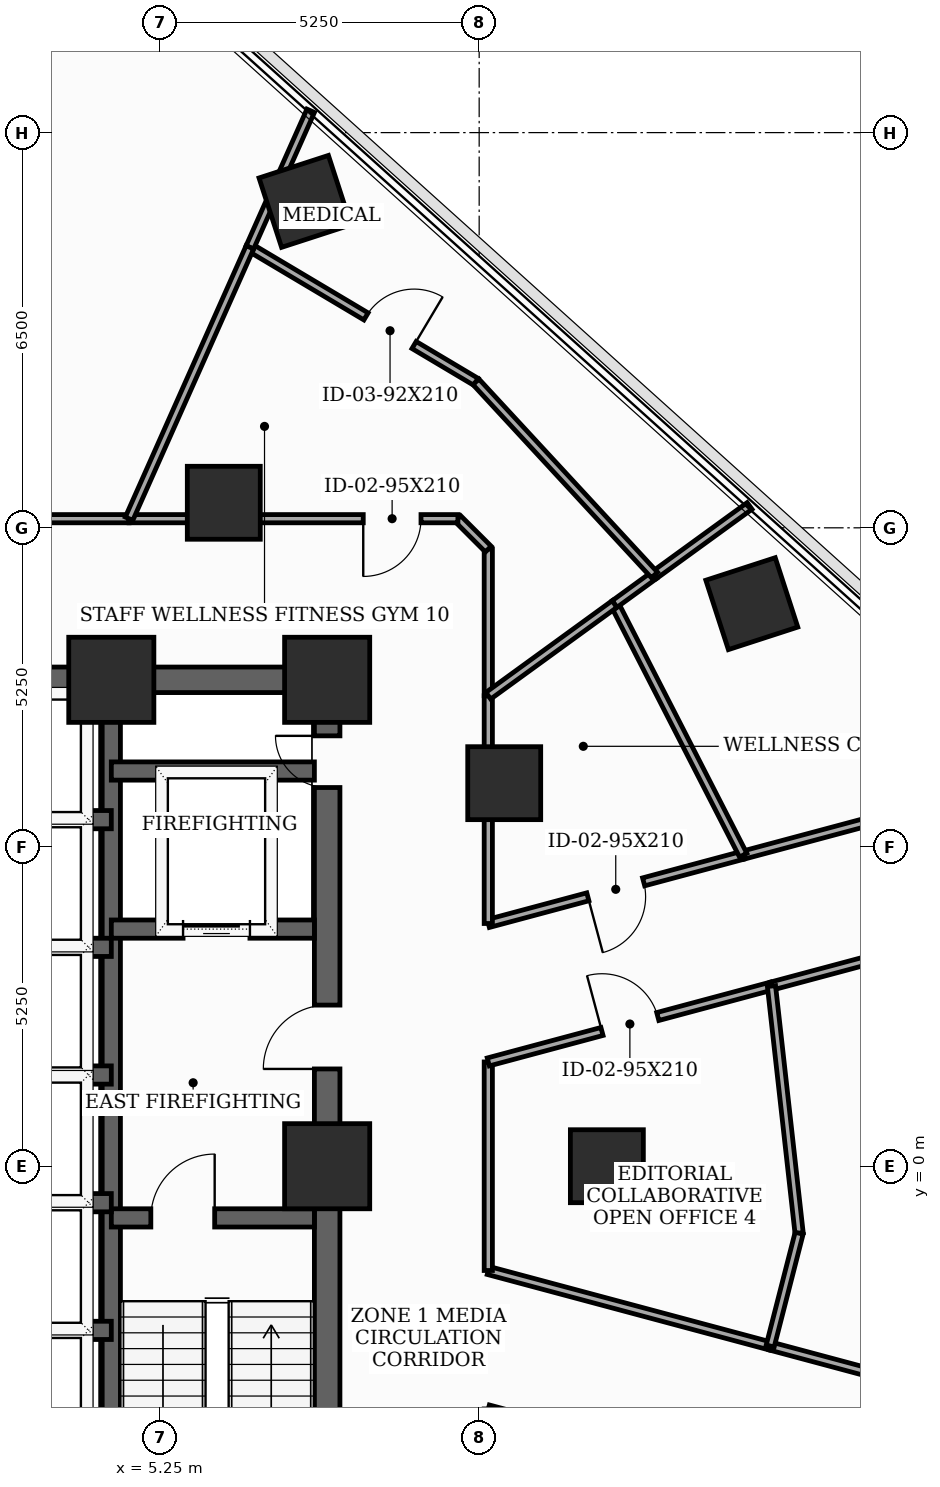
"""IFC4 building model, lengths in metres.
Left out: names, types, materials, properties, quantities, classifications, styles, units other than length and angle.
Written with IfcOpenShell. Run it as: python <this file> out.ifc"""

import sys

from ifc_helpers import new_model, si_unit, direction, frame, frame_2d, origin, origin_2d, place, context, subcontext, project, spatial, rectangle, extrude, element, fill, save


model = new_model("IFC4")
c1 = context("Model", 3, precision=1e-05, world=origin(), true_north=direction((0.0, 1.0)))
c2 = subcontext(c1, "Body", "Model", "MODEL_VIEW")
j1 = project(units=[si_unit("LENGTHUNIT", "METRE"), si_unit("PLANEANGLEUNIT", "RADIAN")], contexts=[c1])
p1 = place(None, origin())
s1 = spatial("IfcSite", under=j1, at=p1, CompositionType="ELEMENT")
p2 = place(p1, origin())
s2 = spatial("IfcBuilding", under=s1, at=p2, CompositionType="ELEMENT")
p3 = place(p2, frame((0.0, 0.0, 101.4)))
s3 = spatial("IfcBuildingStorey", under=s2, at=p3, CompositionType="ELEMENT", Elevation=101.4)
for number, where, z_axis, x_axis in (
    (1, (8.0, 0.0, 0.0), (0.0, 0.0, 1.0), (1.0, 0.0, 0.0)),
    (2, (8.0, 8.0, 0.0), (0.0, 0.0, 1.0), (1.0, 0.0, 0.0)),
    (3, (4.45, 8.0, 0.0), (0.0, 0.0, 1.0), (1.0, 0.0, 0.0)),
):
    element("IfcColumn", number, at=place(p3, frame(where, z_axis=z_axis, x_axis=x_axis)), inside=s3, PredefinedType="COLUMN", context=c2, shape_type="SweptSolid", body=[
        extrude(rectangle(XDim=1.4, YDim=1.4, at=origin_2d()), origin(), (0.0, 0.0, 1.0), 3.7),
    ])
for number, where, z_axis, x_axis in (
    (4, (12.6, 0.0, 0.0), (0.0, 0.0, 1.0), (1.0, 0.0, 0.0)),
    (5, (10.912, 6.3, 0.0), (0.0, 0.0, 1.0), (1.0, 0.0, 0.0)),
    (6, (6.3, 10.912, 0.0), (0.0, 0.0, 1.0), (1.0, 0.0, 0.0)),
    (7, (14.984, 9.252, 0.0), (0.0, 0.0, 1.0), (0.951, 0.309, 0.0)),
    (8, (7.635, 15.869, 0.0), (0.0, 0.0, 1.0), (0.951, 0.309, 0.0)),
):
    element("IfcColumn", number, at=place(p3, frame(where, z_axis=z_axis, x_axis=x_axis)), inside=s3, PredefinedType="COLUMN", context=c2, shape_type="SweptSolid", body=[
        extrude(rectangle(XDim=1.2, YDim=1.2, at=origin_2d()), origin(), (0.0, 0.0, 1.0), 3.7),
    ])
p4 = place(p3, frame((8.0, -8.0, 0.0), z_axis=(0.0, 0.0, 1.0), x_axis=(0.0, 1.0, 0.0)))
e9 = element("IfcWall", 9, at=p4, inside=s3, PredefinedType="SHEAR", context=c2, shape_type="SweptSolid", body=[
    extrude(rectangle(XDim=16.0, YDim=0.42, at=frame_2d((8.0, 0.0))), origin(), (0.0, 0.0, 1.0), 3.5),
])
p5 = place(p4, frame((9.6, 0.0, 0.0)))
e10 = element("IfcOpeningElement", 10, at=p5, cuts=e9, PredefinedType="OPENING", context=c2, shape_type="SweptSolid", body=[
    extrude(rectangle(XDim=1.05, YDim=2.15, at=frame_2d((0.525, 1.075))), frame((0.0, 0.22, 0.0), z_axis=(0.0, -1.0, 0.0), x_axis=(1.0, 0.0, 0.0)), (0.0, 0.0, 1.0), 0.44),
])
p6 = place(p4, frame((14.229, 0.0, 0.0)))
e11 = element("IfcOpeningElement", 11, at=p6, cuts=e9, PredefinedType="OPENING", context=c2, shape_type="SweptSolid", body=[
    extrude(rectangle(XDim=0.85, YDim=2.02, at=frame_2d((0.425, 1.01))), frame((0.0, 0.22, 0.0), z_axis=(0.0, -1.0, 0.0), x_axis=(1.0, 0.0, 0.0)), (0.0, 0.0, 1.0), 0.44),
])
p7 = place(p3, frame((-8.0, 8.0, 0.0), z_axis=(0.0, 0.0, 1.0), x_axis=(1.0, 0.0, 0.0)))
e12 = element("IfcWall", 12, at=p7, inside=s3, PredefinedType="SHEAR", context=c2, shape_type="SweptSolid", body=[
    extrude(rectangle(XDim=16.0, YDim=0.42, at=frame_2d((8.0, 0.0))), origin(), (0.0, 0.0, 1.0), 3.5),
])
p8 = place(p7, frame((7.1, 0.0, 0.0)))
e13 = element("IfcOpeningElement", 13, at=p8, cuts=e12, PredefinedType="OPENING", context=c2, shape_type="SweptSolid", body=[
    extrude(rectangle(XDim=1.8, YDim=2.15, at=frame_2d((0.9, 1.075))), frame((0.0, 0.22, 0.0), z_axis=(0.0, -1.0, 0.0), x_axis=(1.0, 0.0, 0.0)), (0.0, 0.0, 1.0), 0.44),
])
p9 = place(p3, frame((4.45, -7.79, 0.0), z_axis=(0.0, 0.0, 1.0), x_axis=(0.0, 1.0, 0.0)))
e14 = element("IfcWall", 14, at=p9, inside=s3, PredefinedType="SHEAR", context=c2, shape_type="SweptSolid", body=[
    extrude(rectangle(XDim=15.58, YDim=0.3, at=frame_2d((7.79, 0.0))), origin(), (0.0, 0.0, 1.0), 3.5),
])
p10 = place(p3, frame((4.45, -0.85, 0.0), z_axis=(0.0, 0.0, 1.0), x_axis=(1.0, 0.0, 0.0)))
e15 = element("IfcWall", 15, at=p10, inside=s3, PredefinedType="SHEAR", context=c2, shape_type="SweptSolid", body=[
    extrude(rectangle(XDim=3.34, YDim=0.3, at=frame_2d((1.67, 0.0))), origin(), (0.0, 0.0, 1.0), 3.5),
])
p11 = place(p10, frame((0.65, 0.0, 0.0)))
e16 = element("IfcOpeningElement", 16, at=p11, cuts=e15, PredefinedType="OPENING", context=c2, shape_type="SweptSolid", body=[
    extrude(rectangle(XDim=1.05, YDim=2.15, at=frame_2d((0.525, 1.075))), frame((0.0, 0.16, 0.0), z_axis=(0.0, -1.0, 0.0), x_axis=(1.0, 0.0, 0.0)), (0.0, 0.0, 1.0), 0.32),
])
p12 = place(p3, frame((4.45, 3.9, 0.0), z_axis=(0.0, 0.0, 1.0), x_axis=(1.0, 0.0, 0.0)))
e17 = element("IfcWall", 17, at=p12, inside=s3, PredefinedType="SHEAR", context=c2, shape_type="SweptSolid", body=[
    extrude(rectangle(XDim=3.34, YDim=0.3, at=frame_2d((1.67, 0.0))), origin(), (0.0, 0.0, 1.0), 3.5),
])
p13 = place(p12, frame((1.18, 0.0, 0.0)))
e18 = element("IfcOpeningElement", 18, at=p13, cuts=e17, PredefinedType="OPENING", context=c2, shape_type="SweptSolid", body=[
    extrude(rectangle(XDim=1.1, YDim=2.1, at=frame_2d((0.55, 1.05))), frame((0.0, 0.16, 0.0), z_axis=(0.0, -1.0, 0.0), x_axis=(1.0, 0.0, 0.0)), (0.0, 0.0, 1.0), 0.32),
])
p14 = place(p3, frame((4.45, 6.5, 0.0), z_axis=(0.0, 0.0, 1.0), x_axis=(1.0, 0.0, 0.0)))
e19 = element("IfcWall", 19, at=p14, inside=s3, PredefinedType="SHEAR", context=c2, shape_type="SweptSolid", body=[
    extrude(rectangle(XDim=3.34, YDim=0.3, at=frame_2d((1.67, 0.0))), origin(), (0.0, 0.0, 1.0), 3.5),
])
for number, where, z_axis, x_axis in (
    (20, (1.68, 1.5, 0.0), (0.0, 0.0, 1.0), (1.0, 0.0, 0.0)),
    (21, (1.68, 3.6, 0.0), (0.0, 0.0, 1.0), (1.0, 0.0, 0.0)),
    (22, (1.68, 5.7, 0.0), (0.0, 0.0, 1.0), (1.0, 0.0, 0.0)),
    (23, (1.68, -2.7, 0.0), (0.0, 0.0, 1.0), (1.0, 0.0, 0.0)),
    (24, (1.68, -0.6, 0.0), (0.0, 0.0, 1.0), (1.0, 0.0, 0.0)),
):
    element("IfcWall", number, at=place(p3, frame(where, z_axis=z_axis, x_axis=x_axis)), inside=s3, PredefinedType="SHEAR", context=c2, shape_type="SweptSolid", body=[
        extrude(rectangle(XDim=2.77, YDim=0.3, at=frame_2d((1.385, 0.0))), origin(), (0.0, 0.0, 1.0), 3.5),
    ])
p15 = place(p3, frame((22.115, -4.787, 0.0), z_axis=(0.0, 0.0, 1.0), x_axis=(-0.965917838763, 0.258848853116, 0.0)))
e25 = element("IfcWall", 25, at=p15, inside=s3, PredefinedType="PARTITIONING", context=c2, shape_type="SweptSolid", body=[
    extrude(rectangle(XDim=7.07, YDim=0.135, at=frame_2d((3.535, 0.0))), origin(), (0.0, 0.0, 1.0), 2.935),
])
p16 = place(p15, frame((3.06, 0.0, 0.0)))
e26 = element("IfcOpeningElement", 26, at=p16, cuts=e25, PredefinedType="OPENING", context=c2, shape_type="SweptSolid", body=[
    extrude(rectangle(XDim=0.95, YDim=2.1, at=frame_2d((0.475, 1.05))), frame((0.0, 0.077, 0.0), z_axis=(0.0, -1.0, 0.0), x_axis=(1.0, 0.0, 0.0)), (0.0, 0.0, 1.0), 0.155),
])
p17 = place(p3, frame((15.307, 2.963, 0.0), z_axis=(0.0, 0.0, 1.0), x_axis=(0.965966165677, 0.258668449501, 0.0)))
e27 = element("IfcWall", 27, at=p17, inside=s3, PredefinedType="PARTITIONING", context=c2, shape_type="SweptSolid", body=[
    extrude(rectangle(XDim=3.248, YDim=0.135, at=frame_2d((1.624, 0.0))), origin(), (0.0, 0.0, 1.0), 3.125),
])
p18 = place(p3, frame((17.875, 5.928, 0.0), z_axis=(0.0, 0.0, 1.0), x_axis=(-0.96597893007, -0.258620777704, 0.0)))
e28 = element("IfcWall", 28, at=p18, inside=s3, PredefinedType="PARTITIONING", context=c2, shape_type="SweptSolid", body=[
    extrude(rectangle(XDim=3.14, YDim=0.135, at=frame_2d((1.57, 0.0))), origin(), (0.0, 0.0, 1.0), 3.125),
])
p19 = place(p3, frame((10.65, -3.992, 0.0), z_axis=(0.0, 0.0, 1.0), x_axis=(0.965925146235, -0.258821583086, 0.0)))
e29 = element("IfcWall", 29, at=p19, inside=s3, PredefinedType="PARTITIONING", context=c2, shape_type="SweptSolid", body=[
    extrude(rectangle(XDim=4.234, YDim=0.135, at=frame_2d((2.117, 0.0))), origin(), (0.0, 0.0, 1.0), 2.785),
])
p20 = place(p3, frame((15.286, -2.957, 0.0), z_axis=(0.0, 0.0, 1.0), x_axis=(-0.965939651128, 0.258767444588, 0.0)))
e30 = element("IfcWall", 30, at=p20, inside=s3, PredefinedType="PARTITIONING", context=c2, shape_type="SweptSolid", body=[
    extrude(rectangle(XDim=4.8, YDim=0.135, at=frame_2d((2.4, 0.0))), origin(), (0.0, 0.0, 1.0), 2.785),
])
p21 = place(p3, frame((10.65, -1.715, 0.0), z_axis=(0.0, 0.0, 1.0), x_axis=(0.0, 1.0, 0.0)))
e31 = element("IfcWall", 31, at=p21, inside=s3, PredefinedType="PARTITIONING", context=c2, shape_type="SweptSolid", body=[
    extrude(rectangle(XDim=3.43, YDim=0.135, at=frame_2d((1.715, 0.0))), origin(), (0.0, 0.0, 1.0), 2.785),
])
p22 = place(p3, frame((10.65, 1.715, 0.0), z_axis=(0.0, 0.0, 1.0), x_axis=(0.965927482723, 0.258812863129, 0.0)))
e32 = element("IfcWall", 32, at=p22, inside=s3, PredefinedType="PARTITIONING", context=c2, shape_type="SweptSolid", body=[
    extrude(rectangle(XDim=4.821, YDim=0.135, at=frame_2d((2.411, 0.0))), origin(), (0.0, 0.0, 1.0), 2.785),
])
p23 = place(p22, frame((1.936, 0.0, 0.0)))
e33 = element("IfcOpeningElement", 33, at=p23, cuts=e32, PredefinedType="OPENING", context=c2, shape_type="SweptSolid", body=[
    extrude(rectangle(XDim=0.95, YDim=2.1, at=frame_2d((0.475, 1.05))), frame((0.0, 0.077, 0.0), z_axis=(0.0, -1.0, 0.0), x_axis=(1.0, 0.0, 0.0)), (0.0, 0.0, 1.0), 0.155),
])
p24 = place(p3, frame((14.842, 5.116, 0.0), z_axis=(0.0, 0.0, 1.0), x_axis=(-0.965883000332, -0.258978820891, 0.0)))
e34 = element("IfcWall", 34, at=p24, inside=s3, PredefinedType="PARTITIONING", context=c2, shape_type="SweptSolid", body=[
    extrude(rectangle(XDim=4.34, YDim=0.135, at=frame_2d((2.17, 0.0))), origin(), (0.0, 0.0, 1.0), 2.785),
])
p25 = place(p24, frame((1.695, 0.0, 0.0)))
e35 = element("IfcOpeningElement", 35, at=p25, cuts=e34, PredefinedType="OPENING", context=c2, shape_type="SweptSolid", body=[
    extrude(rectangle(XDim=0.95, YDim=2.1, at=frame_2d((0.475, 1.05))), frame((0.0, 0.077, 0.0), z_axis=(0.0, -1.0, 0.0), x_axis=(1.0, 0.0, 0.0)), (0.0, 0.0, 1.0), 0.155),
])
p26 = place(p3, frame((10.65, 3.992, 0.0), z_axis=(0.0, 0.0, 1.0), x_axis=(0.0, 1.0, 0.0)))
e36 = element("IfcWall", 36, at=p26, inside=s3, PredefinedType="PARTITIONING", context=c2, shape_type="SweptSolid", body=[
    extrude(rectangle(XDim=3.746, YDim=0.135, at=frame_2d((1.873, 0.0))), origin(), (0.0, 0.0, 1.0), 2.785),
])
p27 = place(p3, frame((10.65, 7.738, 0.0), z_axis=(0.0, 0.0, 1.0), x_axis=(0.0, 1.0, 0.0)))
e37 = element("IfcWall", 37, at=p27, inside=s3, PredefinedType="PARTITIONING", context=c2, shape_type="SweptSolid", body=[
    extrude(rectangle(XDim=2.412, YDim=0.135, at=frame_2d((1.206, 0.0))), origin(), (0.0, 0.0, 1.0), 3.125),
])
p28 = place(p3, frame((10.65, 10.15, 0.0), z_axis=(0.0, 0.0, 1.0), x_axis=(-0.707106781187, 0.707106781187, 0.0)))
e38 = element("IfcWall", 38, at=p28, inside=s3, PredefinedType="PARTITIONING", context=c2, shape_type="SweptSolid", body=[
    extrude(rectangle(XDim=0.707, YDim=0.135, at=frame_2d((0.354, 0.0))), origin(), (0.0, 0.0, 1.0), 3.125),
])
p29 = place(p3, frame((10.15, 10.65, 0.0), z_axis=(0.0, 0.0, 1.0), x_axis=(-1.0, 0.0, 0.0)))
e39 = element("IfcWall", 39, at=p29, inside=s3, PredefinedType="PARTITIONING", context=c2, shape_type="SweptSolid", body=[
    extrude(rectangle(XDim=5.408, YDim=0.135, at=frame_2d((2.704, 0.0))), origin(), (0.0, 0.0, 1.0), 2.785),
])
p30 = place(p29, frame((0.607, 0.0, 0.0)))
e40 = element("IfcOpeningElement", 40, at=p30, cuts=e39, PredefinedType="OPENING", context=c2, shape_type="SweptSolid", body=[
    extrude(rectangle(XDim=0.95, YDim=2.1, at=frame_2d((0.475, 1.05))), frame((0.0, 0.077, 0.0), z_axis=(0.0, -1.0, 0.0), x_axis=(1.0, 0.0, 0.0)), (0.0, 0.0, 1.0), 0.155),
])
p31 = place(p3, frame((4.742, 10.65, 0.0), z_axis=(0.0, 0.0, 1.0), x_axis=(-1.0, 0.0, 0.0)))
e41 = element("IfcWall", 41, at=p31, inside=s3, PredefinedType="PARTITIONING", context=c2, shape_type="SweptSolid", body=[
    extrude(rectangle(XDim=10.405, YDim=0.135, at=frame_2d((5.203, 0.0))), origin(), (0.0, 0.0, 1.0), 2.785),
])
p32 = place(p31, frame((5.976, 0.0, 0.0)))
e42 = element("IfcOpeningElement", 42, at=p32, cuts=e41, PredefinedType="OPENING", context=c2, shape_type="SweptSolid", body=[
    extrude(rectangle(XDim=0.95, YDim=2.1, at=frame_2d((0.475, 1.05))), frame((0.0, 0.077, 0.0), z_axis=(0.0, -1.0, 0.0), x_axis=(1.0, 0.0, 0.0)), (0.0, 0.0, 1.0), 0.155),
])
p33 = place(p3, frame((15.307, 2.963, 0.0), z_axis=(0.0, 0.0, 1.0), x_axis=(0.111256918124, -0.99379167745, 0.0)))
e43 = element("IfcWall", 43, at=p33, inside=s3, PredefinedType="PARTITIONING", context=c2, shape_type="SweptSolid", body=[
    extrude(rectangle(XDim=4.09, YDim=0.135, at=frame_2d((2.045, 0.0))), origin(), (0.0, 0.0, 1.0), 2.785),
])
p34 = place(p3, frame((15.762, -1.102, 0.0), z_axis=(0.0, 0.0, 1.0), x_axis=(-0.248590042538, -0.968608791386, 0.0)))
e44 = element("IfcWall", 44, at=p34, inside=s3, PredefinedType="PARTITIONING", context=c2, shape_type="SweptSolid", body=[
    extrude(rectangle(XDim=1.915, YDim=0.135, at=frame_2d((0.958, 0.0))), origin(), (0.0, 0.0, 1.0), 3.5),
])
p35 = place(p3, frame((12.726, 9.246, 0.0), z_axis=(0.0, 0.0, 1.0), x_axis=(0.455967351564, -0.889996502413, 0.0)))
e45 = element("IfcWall", 45, at=p35, inside=s3, PredefinedType="PARTITIONING", context=c2, shape_type="SweptSolid", body=[
    extrude(rectangle(XDim=4.641, YDim=0.135, at=frame_2d((2.32, 0.0))), origin(), (0.0, 0.0, 1.0), 2.785),
])
p36 = place(p3, frame((14.947, 10.86, 0.0), z_axis=(0.0, 0.0, 1.0), x_axis=(-0.809090948161, -0.58768345017, 0.0)))
e46 = element("IfcWall", 46, at=p36, inside=s3, PredefinedType="PARTITIONING", context=c2, shape_type="SweptSolid", body=[
    extrude(rectangle(XDim=1.933, YDim=0.135, at=frame_2d((0.967, 0.0))), origin(), (0.0, 0.0, 1.0), 2.935),
])
p37 = place(p3, frame((13.383, 9.724, 0.0), z_axis=(0.0, 0.0, 1.0), x_axis=(-0.808606124949, -0.588350350297, 0.0)))
e47 = element("IfcWall", 47, at=p37, inside=s3, PredefinedType="PARTITIONING", context=c2, shape_type="SweptSolid", body=[
    extrude(rectangle(XDim=0.812, YDim=0.135, at=frame_2d((0.406, 0.0))), origin(), (0.0, 0.0, 1.0), 3.5),
])
p38 = place(p3, frame((12.726, 9.246, 0.0), z_axis=(0.0, 0.0, 1.0), x_axis=(-0.80908565166, -0.587690742039, 0.0)))
e48 = element("IfcWall", 48, at=p38, inside=s3, PredefinedType="PARTITIONING", context=c2, shape_type="SweptSolid", body=[
    extrude(rectangle(XDim=2.566, YDim=0.135, at=frame_2d((1.283, 0.0))), origin(), (0.0, 0.0, 1.0), 3.125),
])
p39 = place(p3, frame((6.729, 15.113, 0.0), z_axis=(0.0, 0.0, 1.0), x_axis=(0.859389125663, -0.511322139841, 0.0)))
e49 = element("IfcWall", 49, at=p39, inside=s3, PredefinedType="PARTITIONING", context=c2, shape_type="SweptSolid", body=[
    extrude(rectangle(XDim=4.326, YDim=0.135, at=frame_2d((2.163, 0.0))), origin(), (0.0, 0.0, 1.0), 2.785),
])
p40 = place(p39, frame((2.222, 0.0, 0.0)))
e50 = element("IfcOpeningElement", 50, at=p40, cuts=e49, PredefinedType="OPENING", context=c2, shape_type="SweptSolid", body=[
    extrude(rectangle(XDim=0.92, YDim=2.1, at=frame_2d((0.46, 1.05))), frame((0.0, 0.077, 0.0), z_axis=(0.0, -1.0, 0.0), x_axis=(1.0, 0.0, 0.0)), (0.0, 0.0, 1.0), 0.155),
])
p41 = place(p3, frame((10.447, 12.901, 0.0), z_axis=(0.0, 0.0, 1.0), x_axis=(0.678734730072, -0.734383527997, 0.0)))
e51 = element("IfcWall", 51, at=p41, inside=s3, PredefinedType="PARTITIONING", context=c2, shape_type="SweptSolid", body=[
    extrude(rectangle(XDim=4.326, YDim=0.135, at=frame_2d((2.163, 0.0))), origin(), (0.0, 0.0, 1.0), 3.5),
])
p42 = place(p3, frame((7.729, 17.359, 0.0), z_axis=(0.0, 0.0, 1.0), x_axis=(-0.406728032322, -0.913549291349, 0.0)))
e52 = element("IfcWall", 52, at=p42, inside=s3, PredefinedType="PARTITIONING", context=c2, shape_type="SweptSolid", body=[
    extrude(rectangle(XDim=2.459, YDim=0.135, at=frame_2d((1.229, 0.0))), origin(), (0.0, 0.0, 1.0), 2.935),
])
p43 = place(p3, frame((6.729, 15.113, 0.0), z_axis=(0.0, 0.0, 1.0), x_axis=(-0.406727234472, -0.913549646565, 0.0)))
e53 = element("IfcWall", 53, at=p43, inside=s3, PredefinedType="PARTITIONING", context=c2, shape_type="SweptSolid", body=[
    extrude(rectangle(XDim=4.885, YDim=0.135, at=frame_2d((2.443, 0.0))), origin(), (0.0, 0.0, 1.0), 2.785),
])
p44 = place(p5, origin())
e54 = element("IfcDoor", 54, at=p44, inside=s3, OperationType="SINGLE_SWING_LEFT", PredefinedType="DOOR", context=c2, shape_type="SweptSolid", body=[
    extrude(rectangle(XDim=1.05, YDim=2.15, at=frame_2d((0.525, 1.075))), frame((0.0, 0.025, 0.0), z_axis=(0.0, -1.0, 0.0), x_axis=(1.0, 0.0, 0.0)), (0.0, 0.0, 1.0), 0.05),
])
fill(e10, e54)
p45 = place(p6, origin())
e55 = element("IfcDoor", 55, at=p45, inside=s3, OperationType="SINGLE_SWING_RIGHT", PredefinedType="TRAPDOOR", context=c2, shape_type="SweptSolid", body=[
    extrude(rectangle(XDim=0.85, YDim=2.02, at=frame_2d((0.425, 1.01))), frame((0.0, 0.025, 0.0), z_axis=(0.0, -1.0, 0.0), x_axis=(1.0, 0.0, 0.0)), (0.0, 0.0, 1.0), 0.05),
])
fill(e11, e55)
p46 = place(p11, origin())
e56 = element("IfcDoor", 56, at=p46, inside=s3, OperationType="SINGLE_SWING_RIGHT", PredefinedType="DOOR", context=c2, shape_type="SweptSolid", body=[
    extrude(rectangle(XDim=1.05, YDim=2.15, at=frame_2d((0.525, 1.075))), frame((0.0, 0.025, 0.0), z_axis=(0.0, -1.0, 0.0), x_axis=(1.0, 0.0, 0.0)), (0.0, 0.0, 1.0), 0.05),
])
fill(e16, e56)
p47 = place(p13, origin())
e57 = element("IfcDoor", 57, at=p47, inside=s3, OperationType="SLIDING_TO_LEFT", PredefinedType="DOOR", context=c2, shape_type="SweptSolid", body=[
    extrude(rectangle(XDim=1.1, YDim=2.1, at=frame_2d((0.55, 1.05))), frame((0.0, 0.025, 0.0), z_axis=(0.0, -1.0, 0.0), x_axis=(1.0, 0.0, 0.0)), (0.0, 0.0, 1.0), 0.05),
])
fill(e18, e57)
p48 = place(p23, origin())
e58 = element("IfcDoor", 58, at=p48, inside=s3, OperationType="SINGLE_SWING_LEFT", PredefinedType="DOOR", context=c2, shape_type="SweptSolid", body=[
    extrude(rectangle(XDim=0.95, YDim=2.1, at=frame_2d((0.475, 1.05))), frame((0.0, 0.025, 0.0), z_axis=(0.0, -1.0, 0.0), x_axis=(1.0, 0.0, 0.0)), (0.0, 0.0, 1.0), 0.05),
])
fill(e33, e58)
p49 = place(p25, origin())
e59 = element("IfcDoor", 59, at=p49, inside=s3, OperationType="SINGLE_SWING_RIGHT", PredefinedType="DOOR", context=c2, shape_type="SweptSolid", body=[
    extrude(rectangle(XDim=0.95, YDim=2.1, at=frame_2d((0.475, 1.05))), frame((0.0, 0.025, 0.0), z_axis=(0.0, -1.0, 0.0), x_axis=(1.0, 0.0, 0.0)), (0.0, 0.0, 1.0), 0.05),
])
fill(e35, e59)
p50 = place(p30, origin())
e60 = element("IfcDoor", 60, at=p50, inside=s3, OperationType="SINGLE_SWING_RIGHT", PredefinedType="DOOR", context=c2, shape_type="SweptSolid", body=[
    extrude(rectangle(XDim=0.95, YDim=2.1, at=frame_2d((0.475, 1.05))), frame((0.0, 0.025, 0.0), z_axis=(0.0, -1.0, 0.0), x_axis=(1.0, 0.0, 0.0)), (0.0, 0.0, 1.0), 0.05),
])
fill(e40, e60)
p51 = place(p40, origin())
e61 = element("IfcDoor", 61, at=p51, inside=s3, OperationType="SINGLE_SWING_RIGHT", PredefinedType="DOOR", context=c2, shape_type="SweptSolid", body=[
    extrude(rectangle(XDim=0.92, YDim=2.1, at=frame_2d((0.46, 1.05))), frame((0.0, 0.025, 0.0), z_axis=(0.0, -1.0, 0.0), x_axis=(1.0, 0.0, 0.0)), (0.0, 0.0, 1.0), 0.05),
])
fill(e50, e61)
save(model, sys.argv[1])
